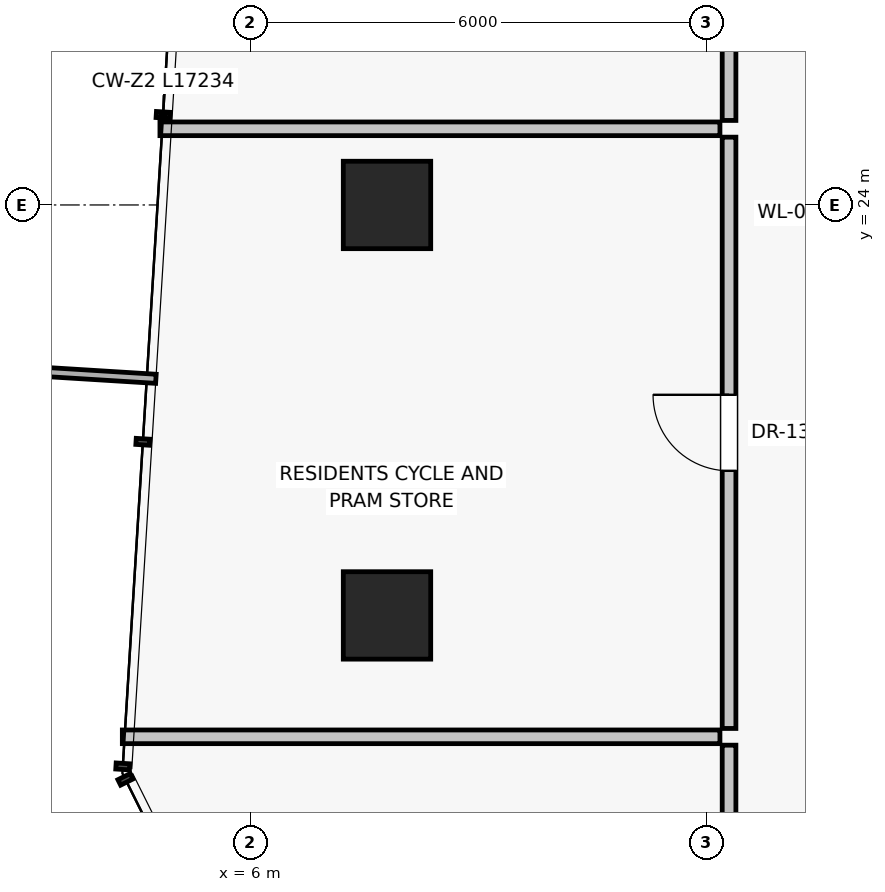
"""IFC4 building model, lengths in metres.
Left out: names, types, materials, properties, quantities, classifications, styles, units other than length and angle.
Written with IfcOpenShell. Run it as: python <this file> out.ifc"""

import sys

from ifc_helpers import new_model, si_unit, direction, frame, frame_2d, origin, origin_2d, place, context, subcontext, project, spatial, rectangle, extrude, source, transform, mapped, element, fill, save


model = new_model("IFC4")
c1 = context("Model", 3, precision=1e-05, world=origin(), true_north=direction((0.0, 1.0)))
c2 = subcontext(c1, "Body", "Model", "MODEL_VIEW")
j1 = project(units=[si_unit("LENGTHUNIT", "METRE"), si_unit("PLANEANGLEUNIT", "RADIAN")], contexts=[c1])
p1 = place(None, origin())
s1 = spatial("IfcSite", under=j1, at=p1, CompositionType="ELEMENT")
p2 = place(p1, origin())
s2 = spatial("IfcBuilding", under=s1, at=p2, CompositionType="ELEMENT")
p3 = place(p2, frame((0.0, 0.0, 116.5)))
s3 = spatial("IfcBuildingStorey", under=s2, at=p3, CompositionType="ELEMENT", Elevation=116.5)
for number, where, z_axis, x_axis in (
    (1, (7.8, 24.0, 0.0), (0.0, 0.0, 1.0), (1.0, 0.0, 0.0)),
    (2, (7.8, 18.6, 0.0), (0.0, 0.0, 1.0), (1.0, 0.0, 0.0)),
):
    element("IfcColumn", number, at=place(p3, frame(where, z_axis=z_axis, x_axis=x_axis)), inside=s3, PredefinedType="COLUMN", context=c2, shape_type="SweptSolid", body=[
        extrude(rectangle(XDim=1.15, YDim=1.15, at=origin_2d()), origin(), (0.0, 0.0, 1.0), 3.25),
    ])
p4 = place(p3, frame((12.3, 12.21, 0.0), z_axis=(0.0, 0.0, 1.0), x_axis=(0.0, 1.0, 0.0)))
e3 = element("IfcWall", 3, at=p4, inside=s3, PredefinedType="PARTITIONING", context=c2, shape_type="SweptSolid", body=[
    extrude(rectangle(XDim=4.683, YDim=0.18, at=frame_2d((2.342, 0.0))), origin(), (0.0, 0.0, 1.0), 3.0),
])
p5 = place(p4, frame((1.842, 0.0, 0.0)))
e4 = element("IfcOpeningElement", 4, at=p5, cuts=e3, PredefinedType="OPENING", context=c2, shape_type="SweptSolid", body=[
    extrude(rectangle(XDim=1.0, YDim=2.01, at=frame_2d((0.5, 1.005))), frame((0.0, 0.1, 0.0), z_axis=(0.0, -1.0, 0.0), x_axis=(1.0, 0.0, 0.0)), (0.0, 0.0, 1.0), 0.2),
])
p6 = place(p3, frame((12.3, 17.113, 0.0), z_axis=(0.0, 0.0, 1.0), x_axis=(0.0, 1.0, 0.0)))
e5 = element("IfcWall", 5, at=p6, inside=s3, PredefinedType="PARTITIONING", context=c2, shape_type="SweptSolid", body=[
    extrude(rectangle(XDim=7.779, YDim=0.18, at=frame_2d((3.89, 0.0))), origin(), (0.0, 0.0, 1.0), 2.58),
])
p7 = place(p6, frame((3.389, 0.0, 0.0)))
e6 = element("IfcOpeningElement", 6, at=p7, cuts=e5, PredefinedType="OPENING", context=c2, shape_type="SweptSolid", body=[
    extrude(rectangle(XDim=1.0, YDim=2.01, at=frame_2d((0.5, 1.005))), frame((0.0, 0.1, 0.0), z_axis=(0.0, -1.0, 0.0), x_axis=(1.0, 0.0, 0.0)), (0.0, 0.0, 1.0), 0.2),
])
p8 = place(p3, frame((12.18, 17.003, 0.0), z_axis=(0.0, 0.0, 1.0), x_axis=(-1.0, 0.0, 0.0)))
e7 = element("IfcWall", 7, at=p8, inside=s3, PredefinedType="PARTITIONING", context=c2, shape_type="SweptSolid", body=[
    extrude(rectangle(XDim=7.862, YDim=0.18, at=frame_2d((3.931, 0.0))), origin(), (0.0, 0.0, 1.0), 3.0),
])
p9 = place(p3, frame((12.18, 25.002, 0.0), z_axis=(0.0, 0.0, 1.0), x_axis=(-1.0, 0.0, 0.0)))
e8 = element("IfcWall", 8, at=p9, inside=s3, PredefinedType="PARTITIONING", context=c2, shape_type="SweptSolid", body=[
    extrude(rectangle(XDim=7.367, YDim=0.18, at=frame_2d((3.684, 0.0))), origin(), (0.0, 0.0, 1.0), 3.0),
])
p10 = place(p3, frame((12.3, 25.112, 0.0), z_axis=(0.0, 0.0, 1.0), x_axis=(0.0, 1.0, 0.0)))
e9 = element("IfcWall", 9, at=p10, inside=s3, PredefinedType="PARTITIONING", context=c2, shape_type="SweptSolid", body=[
    extrude(rectangle(XDim=3.845, YDim=0.18, at=frame_2d((1.922, 0.0))), origin(), (0.0, 0.0, 1.0), 2.58),
])
p11 = place(p10, frame((1.423, 0.0, 0.0)))
e10 = element("IfcOpeningElement", 10, at=p11, cuts=e9, PredefinedType="OPENING", context=c2, shape_type="SweptSolid", body=[
    extrude(rectangle(XDim=1.0, YDim=2.01, at=frame_2d((0.5, 1.005))), frame((0.0, 0.1, 0.0), z_axis=(0.0, -1.0, 0.0), x_axis=(1.0, 0.0, 0.0)), (0.0, 0.0, 1.0), 0.2),
])
m1 = source(origin(), c2, "Body", "SweptSolid", [
    extrude(rectangle(XDim=1.0, YDim=2.01, at=frame_2d((0.5, 1.005))), frame((0.0, 0.025, 0.0), z_axis=(0.0, -1.0, 0.0), x_axis=(1.0, 0.0, 0.0)), (0.0, 0.0, 1.0), 0.05),
])
p12 = place(p7, origin())
e11 = element("IfcDoor", 11, at=p12, inside=s3, OperationType="SINGLE_SWING_RIGHT", PredefinedType="DOOR", context=c2, shape_type="MappedRepresentation", body=[
    mapped(m1, transform((0.0, 0.0, 0.0), scale=1.0)),
])
fill(e6, e11)
save(model, sys.argv[1])
